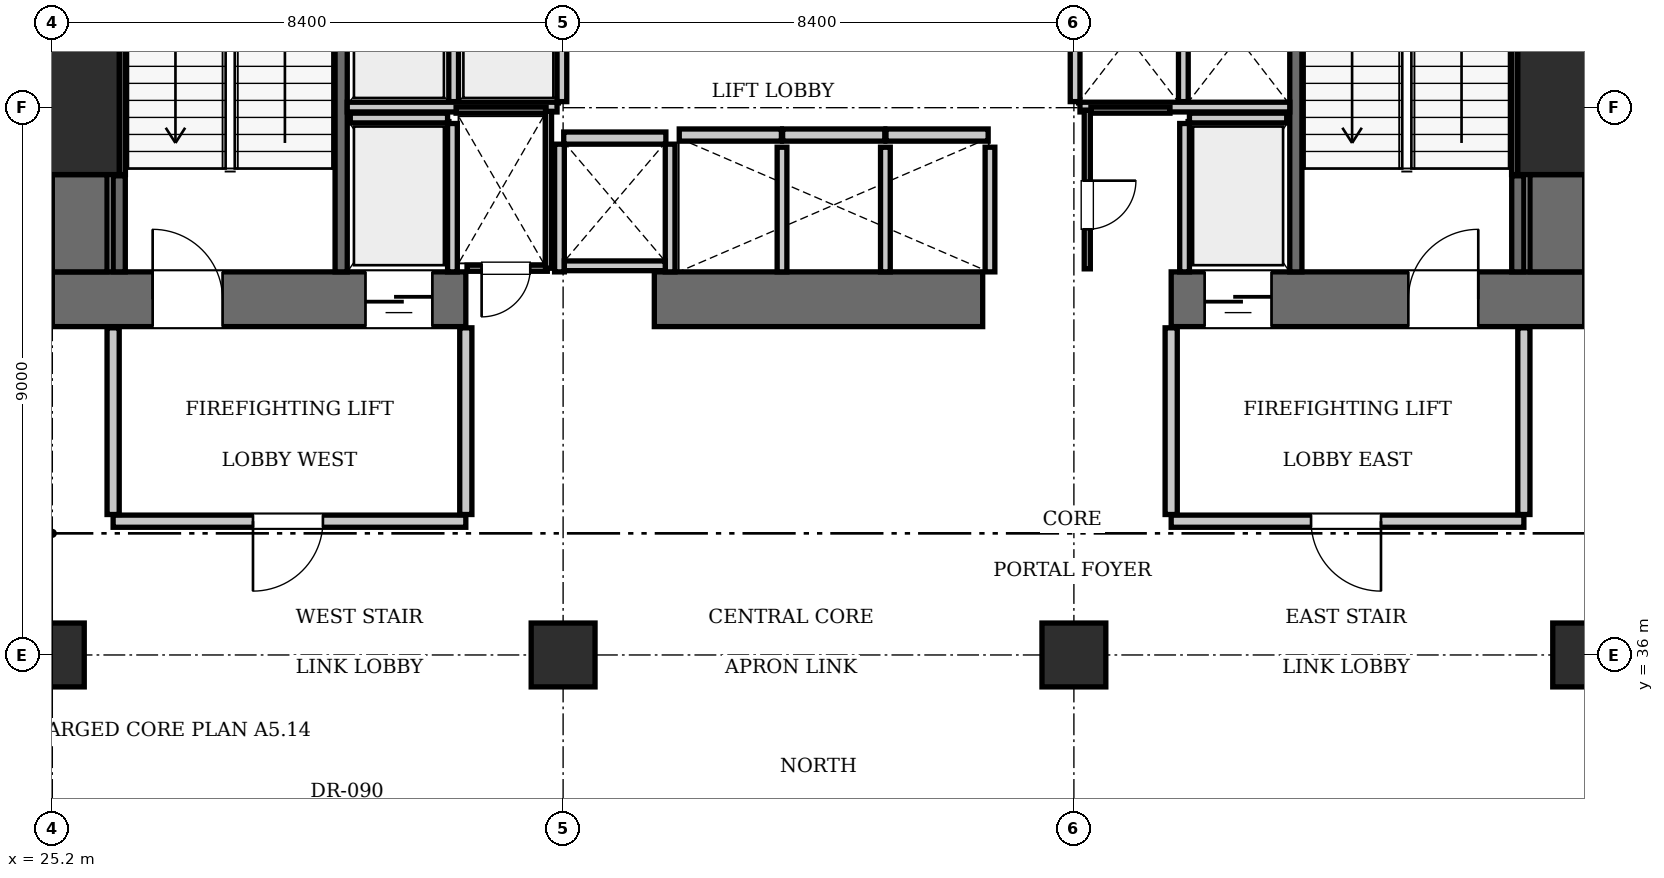
"""IFC4 building model, lengths in metres.
Left out: names, types, materials, properties, quantities, classifications, styles, units other than length and angle.
Written with IfcOpenShell. Run it as: python <this file> out.ifc"""

import sys

from ifc_helpers import new_model, si_unit, direction, frame, frame_2d, origin, origin_2d, place, context, subcontext, project, spatial, rectangle, extrude, element, fill, save


model = new_model("IFC4")
c1 = context("Model", 3, precision=1e-05, world=origin(), true_north=direction((0.0, 1.0)))
c2 = subcontext(c1, "Body", "Model", "MODEL_VIEW")
j1 = project(units=[si_unit("LENGTHUNIT", "METRE"), si_unit("PLANEANGLEUNIT", "RADIAN")], contexts=[c1])
p1 = place(None, origin())
s1 = spatial("IfcSite", under=j1, at=p1, CompositionType="ELEMENT")
p2 = place(p1, origin())
s2 = spatial("IfcBuilding", under=s1, at=p2, CompositionType="ELEMENT")
p3 = place(p2, frame((0.0, 0.0, 103.95)))
s3 = spatial("IfcBuildingStorey", under=s2, at=p3, CompositionType="ELEMENT", Elevation=103.95)
for number, where, z_axis, x_axis in (
    (1, (25.2, 45.0, 0.0), (0.0, 0.0, 1.0), (1.0, 0.0, 0.0)),
    (2, (50.4, 45.0, 0.0), (0.0, 0.0, 1.0), (1.0, 0.0, 0.0)),
):
    element("IfcColumn", number, at=place(p3, frame(where, z_axis=z_axis, x_axis=x_axis)), inside=s3, PredefinedType="COLUMN", context=c2, shape_type="SweptSolid", body=[
        extrude(rectangle(XDim=2.2, YDim=2.2, at=origin_2d()), origin(), (0.0, 0.0, 1.0), 3.85),
    ])
p4 = place(p3, frame((25.2, 41.85, 0.0), z_axis=(0.0, 0.0, 1.0), x_axis=(1.0, 0.0, 0.0)))
e3 = element("IfcWall", 3, at=p4, inside=s3, PredefinedType="SHEAR", context=c2, shape_type="SweptSolid", body=[
    extrude(rectangle(XDim=6.8, YDim=0.9, at=frame_2d((3.4, 0.0))), origin(), (0.0, 0.0, 1.0), 3.85),
])
p5 = place(p4, frame((1.65, 0.0, 0.0)))
e4 = element("IfcOpeningElement", 4, at=p5, cuts=e3, PredefinedType="OPENING", context=c2, shape_type="SweptSolid", body=[
    extrude(rectangle(XDim=1.15, YDim=2.15, at=frame_2d((0.575, 1.075))), frame((0.0, 0.46, 0.0), z_axis=(0.0, -1.0, 0.0), x_axis=(1.0, 0.0, 0.0)), (0.0, 0.0, 1.0), 0.92),
])
p6 = place(p4, frame((5.15, 0.0, 0.0)))
e5 = element("IfcOpeningElement", 5, at=p6, cuts=e3, PredefinedType="OPENING", context=c2, shape_type="SweptSolid", body=[
    extrude(rectangle(XDim=1.1, YDim=2.2, at=frame_2d((0.55, 1.1))), frame((0.0, 0.46, 0.0), z_axis=(0.0, -1.0, 0.0), x_axis=(1.0, 0.0, 0.0)), (0.0, 0.0, 1.0), 0.92),
])
p7 = place(p3, frame((35.1, 41.85, 0.0), z_axis=(0.0, 0.0, 1.0), x_axis=(1.0, 0.0, 0.0)))
e6 = element("IfcWall", 6, at=p7, inside=s3, PredefinedType="SHEAR", context=c2, shape_type="SweptSolid", body=[
    extrude(rectangle(XDim=5.4, YDim=0.9, at=frame_2d((2.7, 0.0))), origin(), (0.0, 0.0, 1.0), 3.85),
])
p8 = place(p3, frame((43.6, 41.85, 0.0), z_axis=(0.0, 0.0, 1.0), x_axis=(1.0, 0.0, 0.0)))
e7 = element("IfcWall", 7, at=p8, inside=s3, PredefinedType="SHEAR", context=c2, shape_type="SweptSolid", body=[
    extrude(rectangle(XDim=6.8, YDim=0.9, at=frame_2d((3.4, 0.0))), origin(), (0.0, 0.0, 1.0), 3.85),
])
p9 = place(p8, frame((3.9, 0.0, 0.0)))
e8 = element("IfcOpeningElement", 8, at=p9, cuts=e7, PredefinedType="OPENING", context=c2, shape_type="SweptSolid", body=[
    extrude(rectangle(XDim=1.15, YDim=2.15, at=frame_2d((0.575, 1.075))), frame((0.0, 0.46, 0.0), z_axis=(0.0, -1.0, 0.0), x_axis=(1.0, 0.0, 0.0)), (0.0, 0.0, 1.0), 0.92),
])
p10 = place(p8, frame((0.55, 0.0, 0.0)))
e9 = element("IfcOpeningElement", 9, at=p10, cuts=e7, PredefinedType="OPENING", context=c2, shape_type="SweptSolid", body=[
    extrude(rectangle(XDim=1.1, YDim=2.2, at=frame_2d((0.55, 1.1))), frame((0.0, 0.46, 0.0), z_axis=(0.0, -1.0, 0.0), x_axis=(1.0, 0.0, 0.0)), (0.0, 0.0, 1.0), 0.92),
])
for number, where, z_axis, x_axis in (
    (10, (25.65, 42.3, 0.0), (0.0, 0.0, 1.0), (0.0, 1.0, 0.0)),
    (11, (49.95, 42.3, 0.0), (0.0, 0.0, 1.0), (0.0, 1.0, 0.0)),
):
    element("IfcWall", number, at=place(p3, frame(where, z_axis=z_axis, x_axis=x_axis)), inside=s3, PredefinedType="SHEAR", context=c2, shape_type="SweptSolid", body=[
        extrude(rectangle(XDim=1.6, YDim=0.9, at=frame_2d((0.8, 0.0))), origin(), (0.0, 0.0, 1.0), 3.85),
    ])
for number, where, z_axis, x_axis in (
    (12, (25.2, 36.0, 0.0), (0.0, 0.0, 1.0), (1.0, 0.0, 0.0)),
    (13, (33.6, 36.0, 0.0), (0.0, 0.0, 1.0), (1.0, 0.0, 0.0)),
    (14, (42.0, 36.0, 0.0), (0.0, 0.0, 1.0), (1.0, 0.0, 0.0)),
    (15, (50.4, 36.0, 0.0), (0.0, 0.0, 1.0), (1.0, 0.0, 0.0)),
):
    element("IfcColumn", number, at=place(p3, frame(where, z_axis=z_axis, x_axis=x_axis)), inside=s3, PredefinedType="COLUMN", context=c2, shape_type="SweptSolid", body=[
        extrude(rectangle(XDim=1.05, YDim=1.05, at=origin_2d()), origin(), (0.0, 0.0, 1.0), 3.85),
    ])
p11 = place(p3, frame((29.95, 42.3, 0.0), z_axis=(0.0, 0.0, 1.0), x_axis=(0.0, 1.0, 0.0)))
e16 = element("IfcWall", 16, at=p11, inside=s3, PredefinedType="SOLIDWALL", context=c2, shape_type="SweptSolid", body=[
    extrude(rectangle(XDim=8.85, YDim=0.2, at=frame_2d((4.425, 0.0))), origin(), (0.0, 0.0, 1.0), 3.61),
])
p12 = place(p3, frame((26.3, 42.3, 0.0), z_axis=(0.0, 0.0, 1.0), x_axis=(0.0, 1.0, 0.0)))
e17 = element("IfcWall", 17, at=p12, inside=s3, PredefinedType="SOLIDWALL", context=c2, shape_type="SweptSolid", body=[
    extrude(rectangle(XDim=1.58, YDim=0.2, at=frame_2d((0.79, 0.0))), origin(), (0.0, 0.0, 1.0), 3.61),
])
p13 = place(p3, frame((26.352, 43.9, 0.0), z_axis=(0.0, 0.0, 1.0), x_axis=(0.0, 1.0, 0.0)))
e18 = element("IfcWall", 18, at=p13, inside=s3, PredefinedType="SOLIDWALL", context=c2, shape_type="SweptSolid", body=[
    extrude(rectangle(XDim=2.2, YDim=0.1, at=frame_2d((1.1, 0.0))), origin(), (0.0, 0.0, 1.0), 3.61),
])
p14 = place(p3, frame((45.65, 42.3, 0.0), z_axis=(0.0, 0.0, 1.0), x_axis=(0.0, 1.0, 0.0)))
e19 = element("IfcWall", 19, at=p14, inside=s3, PredefinedType="SOLIDWALL", context=c2, shape_type="SweptSolid", body=[
    extrude(rectangle(XDim=8.85, YDim=0.2, at=frame_2d((4.425, 0.0))), origin(), (0.0, 0.0, 1.0), 3.61),
])
p15 = place(p3, frame((49.3, 42.3, 0.0), z_axis=(0.0, 0.0, 1.0), x_axis=(0.0, 1.0, 0.0)))
e20 = element("IfcWall", 20, at=p15, inside=s3, PredefinedType="SOLIDWALL", context=c2, shape_type="SweptSolid", body=[
    extrude(rectangle(XDim=1.58, YDim=0.2, at=frame_2d((0.79, 0.0))), origin(), (0.0, 0.0, 1.0), 3.61),
])
p16 = place(p3, frame((49.248, 43.9, 0.0), z_axis=(0.0, 0.0, 1.0), x_axis=(0.0, 1.0, 0.0)))
e21 = element("IfcWall", 21, at=p16, inside=s3, PredefinedType="SOLIDWALL", context=c2, shape_type="SweptSolid", body=[
    extrude(rectangle(XDim=2.2, YDim=0.1, at=frame_2d((1.1, 0.0))), origin(), (0.0, 0.0, 1.0), 3.61),
])
for number, where, z_axis, x_axis in (
    (22, (35.51, 44.55, 0.0), (0.0, 0.0, 1.0), (1.0, 0.0, 0.0)),
    (23, (37.21, 44.55, 0.0), (0.0, 0.0, 1.0), (1.0, 0.0, 0.0)),
):
    element("IfcWall", number, at=place(p3, frame(where, z_axis=z_axis, x_axis=x_axis)), inside=s3, PredefinedType="SOLIDWALL", context=c2, shape_type="SweptSolid", body=[
        extrude(rectangle(XDim=1.68, YDim=0.2, at=frame_2d((0.84, 0.0))), origin(), (0.0, 0.0, 1.0), 3.61),
    ])
p17 = place(p3, frame((38.91, 44.55, 0.0), z_axis=(0.0, 0.0, 1.0), x_axis=(1.0, 0.0, 0.0)))
e24 = element("IfcWall", 24, at=p17, inside=s3, PredefinedType="SOLIDWALL", context=c2, shape_type="SweptSolid", body=[
    extrude(rectangle(XDim=1.68, YDim=0.2, at=frame_2d((0.84, 0.0))), origin(), (0.0, 0.0, 1.0), 3.61),
])
p18 = place(p3, frame((33.61, 44.5, 0.0), z_axis=(0.0, 0.0, 1.0), x_axis=(1.0, 0.0, 0.0)))
e25 = element("IfcWall", 25, at=p18, inside=s3, PredefinedType="SOLIDWALL", context=c2, shape_type="SweptSolid", body=[
    extrude(rectangle(XDim=1.68, YDim=0.2, at=frame_2d((0.84, 0.0))), origin(), (0.0, 0.0, 1.0), 3.61),
])
p19 = place(p3, frame((30.1, 44.83, 0.0), z_axis=(0.0, 0.0, 1.0), x_axis=(1.0, 0.0, 0.0)))
e26 = element("IfcWall", 26, at=p19, inside=s3, PredefinedType="SOLIDWALL", context=c2, shape_type="SweptSolid", body=[
    extrude(rectangle(XDim=1.6, YDim=0.16, at=frame_2d((0.8, 0.0))), origin(), (0.0, 0.0, 1.0), 3.61),
])
p20 = place(p3, frame((31.78, 42.3, 0.0), z_axis=(0.0, 0.0, 1.0), x_axis=(0.0, 1.0, 0.0)))
e27 = element("IfcWall", 27, at=p20, inside=s3, PredefinedType="SOLIDWALL", context=c2, shape_type="SweptSolid", body=[
    extrude(rectangle(XDim=2.44, YDim=0.16, at=frame_2d((1.22, 0.0))), origin(), (0.0, 0.0, 1.0), 3.61),
])
p21 = place(p3, frame((43.9, 44.83, 0.0), z_axis=(0.0, 0.0, 1.0), x_axis=(1.0, 0.0, 0.0)))
e28 = element("IfcWall", 28, at=p21, inside=s3, PredefinedType="SOLIDWALL", context=c2, shape_type="SweptSolid", body=[
    extrude(rectangle(XDim=1.6, YDim=0.16, at=frame_2d((0.8, 0.0))), origin(), (0.0, 0.0, 1.0), 3.61),
])
p22 = place(p3, frame((43.82, 42.3, 0.0), z_axis=(0.0, 0.0, 1.0), x_axis=(0.0, 1.0, 0.0)))
e29 = element("IfcWall", 29, at=p22, inside=s3, PredefinedType="SOLIDWALL", context=c2, shape_type="SweptSolid", body=[
    extrude(rectangle(XDim=2.44, YDim=0.16, at=frame_2d((1.22, 0.0))), origin(), (0.0, 0.0, 1.0), 3.61),
])
for number, where, z_axis, x_axis in (
    (30, (31.8, 45.1, 0.0), (0.0, 0.0, 1.0), (0.0, 1.0, 0.0)),
    (31, (33.58, 45.1, 0.0), (0.0, 0.0, 1.0), (0.0, 1.0, 0.0)),
):
    element("IfcWall", number, at=place(p3, frame(where, z_axis=z_axis, x_axis=x_axis)), inside=s3, PredefinedType="SOLIDWALL", context=c2, shape_type="SweptSolid", body=[
        extrude(rectangle(XDim=1.95, YDim=0.16, at=frame_2d((0.975, 0.0))), origin(), (0.0, 0.0, 1.0), 3.61),
    ])
p23 = place(p3, frame((30.05, 45.01, 0.0), z_axis=(0.0, 0.0, 1.0), x_axis=(1.0, 0.0, 0.0)))
e32 = element("IfcWall", 32, at=p23, inside=s3, PredefinedType="SOLIDWALL", context=c2, shape_type="SweptSolid", body=[
    extrude(rectangle(XDim=3.45, YDim=0.16, at=frame_2d((1.725, 0.0))), origin(), (0.0, 0.0, 1.0), 3.61),
])
for number, where, z_axis, x_axis in (
    (33, (42.02, 45.1, 0.0), (0.0, 0.0, 1.0), (0.0, 1.0, 0.0)),
    (34, (43.8, 45.1, 0.0), (0.0, 0.0, 1.0), (0.0, 1.0, 0.0)),
):
    element("IfcWall", number, at=place(p3, frame(where, z_axis=z_axis, x_axis=x_axis)), inside=s3, PredefinedType="SOLIDWALL", context=c2, shape_type="SweptSolid", body=[
        extrude(rectangle(XDim=1.95, YDim=0.16, at=frame_2d((0.975, 0.0))), origin(), (0.0, 0.0, 1.0), 3.61),
    ])
p24 = place(p3, frame((42.1, 45.01, 0.0), z_axis=(0.0, 0.0, 1.0), x_axis=(1.0, 0.0, 0.0)))
e35 = element("IfcWall", 35, at=p24, inside=s3, PredefinedType="SOLIDWALL", context=c2, shape_type="SweptSolid", body=[
    extrude(rectangle(XDim=3.45, YDim=0.16, at=frame_2d((1.725, 0.0))), origin(), (0.0, 0.0, 1.0), 3.61),
])
for number, where, z_axis, x_axis in (
    (36, (37.2, 42.3, 0.0), (0.0, 0.0, 1.0), (0.0, 1.0, 0.0)),
    (37, (38.9, 42.3, 0.0), (0.0, 0.0, 1.0), (0.0, 1.0, 0.0)),
    (38, (40.62, 42.3, 0.0), (0.0, 0.0, 1.0), (0.0, 1.0, 0.0)),
):
    element("IfcWall", number, at=place(p3, frame(where, z_axis=z_axis, x_axis=x_axis)), inside=s3, PredefinedType="SOLIDWALL", context=c2, shape_type="SweptSolid", body=[
        extrude(rectangle(XDim=2.05, YDim=0.16, at=frame_2d((1.025, 0.0))), origin(), (0.0, 0.0, 1.0), 3.61),
    ])
for number, where, z_axis, x_axis in (
    (39, (33.54, 42.3, 0.0), (0.0, 0.0, 1.0), (0.0, 1.0, 0.0)),
    (40, (35.36, 42.3, 0.0), (0.0, 0.0, 1.0), (0.0, 1.0, 0.0)),
):
    element("IfcWall", number, at=place(p3, frame(where, z_axis=z_axis, x_axis=x_axis)), inside=s3, PredefinedType="SOLIDWALL", context=c2, shape_type="SweptSolid", body=[
        extrude(rectangle(XDim=2.1, YDim=0.16, at=frame_2d((1.05, 0.0))), origin(), (0.0, 0.0, 1.0), 3.61),
    ])
p25 = place(p3, frame((33.62, 42.4, 0.0), z_axis=(0.0, 0.0, 1.0), x_axis=(1.0, 0.0, 0.0)))
e41 = element("IfcWall", 41, at=p25, inside=s3, PredefinedType="SOLIDWALL", context=c2, shape_type="SweptSolid", body=[
    extrude(rectangle(XDim=1.66, YDim=0.16, at=frame_2d((0.83, 0.0))), origin(), (0.0, 0.0, 1.0), 3.61),
])
p26 = place(p3, frame((26.2, 38.2, 0.0), z_axis=(0.0, 0.0, 1.0), x_axis=(1.0, 0.0, 0.0)))
e42 = element("IfcWall", 42, at=p26, inside=s3, PredefinedType="PARTITIONING", context=c2, shape_type="SweptSolid", body=[
    extrude(rectangle(XDim=5.8, YDim=0.2, at=frame_2d((2.9, 0.0))), origin(), (0.0, 0.0, 1.0), 3.61),
])
p27 = place(p26, frame((2.3, 0.0, 0.0)))
e43 = element("IfcOpeningElement", 43, at=p27, cuts=e42, PredefinedType="OPENING", context=c2, shape_type="SweptSolid", body=[
    extrude(rectangle(XDim=1.15, YDim=2.15, at=frame_2d((0.575, 1.075))), frame((0.0, 0.11, 0.0), z_axis=(0.0, -1.0, 0.0), x_axis=(1.0, 0.0, 0.0)), (0.0, 0.0, 1.0), 0.22),
])
for number, where, z_axis, x_axis in (
    (44, (26.2, 38.31, 0.0), (0.0, 0.0, 1.0), (0.0, 1.0, 0.0)),
    (45, (32.0, 38.31, 0.0), (0.0, 0.0, 1.0), (0.0, 1.0, 0.0)),
):
    element("IfcWall", number, at=place(p3, frame(where, z_axis=z_axis, x_axis=x_axis)), inside=s3, PredefinedType="PARTITIONING", context=c2, shape_type="SweptSolid", body=[
        extrude(rectangle(XDim=3.07, YDim=0.2, at=frame_2d((1.535, 0.0))), origin(), (0.0, 0.0, 1.0), 3.61),
    ])
p28 = place(p3, frame((43.6, 38.2, 0.0), z_axis=(0.0, 0.0, 1.0), x_axis=(1.0, 0.0, 0.0)))
e46 = element("IfcWall", 46, at=p28, inside=s3, PredefinedType="PARTITIONING", context=c2, shape_type="SweptSolid", body=[
    extrude(rectangle(XDim=5.8, YDim=0.2, at=frame_2d((2.9, 0.0))), origin(), (0.0, 0.0, 1.0), 3.61),
])
p29 = place(p28, frame((2.3, 0.0, 0.0)))
e47 = element("IfcOpeningElement", 47, at=p29, cuts=e46, PredefinedType="OPENING", context=c2, shape_type="SweptSolid", body=[
    extrude(rectangle(XDim=1.15, YDim=2.15, at=frame_2d((0.575, 1.075))), frame((0.0, 0.11, 0.0), z_axis=(0.0, -1.0, 0.0), x_axis=(1.0, 0.0, 0.0)), (0.0, 0.0, 1.0), 0.22),
])
for number, where, z_axis, x_axis in (
    (48, (43.6, 38.31, 0.0), (0.0, 0.0, 1.0), (0.0, 1.0, 0.0)),
    (49, (49.4, 38.31, 0.0), (0.0, 0.0, 1.0), (0.0, 1.0, 0.0)),
):
    element("IfcWall", number, at=place(p3, frame(where, z_axis=z_axis, x_axis=x_axis)), inside=s3, PredefinedType="PARTITIONING", context=c2, shape_type="SweptSolid", body=[
        extrude(rectangle(XDim=3.07, YDim=0.2, at=frame_2d((1.535, 0.0))), origin(), (0.0, 0.0, 1.0), 3.61),
    ])
p30 = place(p3, frame((32.02, 42.36, 0.0), z_axis=(0.0, 0.0, 1.0), x_axis=(1.0, 0.0, 0.0)))
e50 = element("IfcWall", 50, at=p30, inside=s3, PredefinedType="PARTITIONING", context=c2, shape_type="SweptSolid", body=[
    extrude(rectangle(XDim=1.32, YDim=0.1, at=frame_2d((0.66, 0.0))), origin(), (0.0, 0.0, 1.0), 3.61),
])
p31 = place(p30, frame((0.24, 0.0, 0.0)))
e51 = element("IfcOpeningElement", 51, at=p31, cuts=e50, PredefinedType="OPENING", context=c2, shape_type="SweptSolid", body=[
    extrude(rectangle(XDim=0.8, YDim=2.05, at=frame_2d((0.4, 1.025))), frame((0.0, 0.06, 0.0), z_axis=(0.0, -1.0, 0.0), x_axis=(1.0, 0.0, 0.0)), (0.0, 0.0, 1.0), 0.12),
])
p32 = place(p3, frame((31.84, 44.96, 0.0), z_axis=(0.0, 0.0, 1.0), x_axis=(1.0, 0.0, 0.0)))
e52 = element("IfcWall", 52, at=p32, inside=s3, PredefinedType="PARTITIONING", context=c2, shape_type="SweptSolid", body=[
    extrude(rectangle(XDim=1.48, YDim=0.1, at=frame_2d((0.74, 0.0))), origin(), (0.0, 0.0, 1.0), 3.61),
])
p33 = place(p3, frame((33.36, 42.36, 0.0), z_axis=(0.0, 0.0, 1.0), x_axis=(0.0, 1.0, 0.0)))
e53 = element("IfcWall", 53, at=p33, inside=s3, PredefinedType="PARTITIONING", context=c2, shape_type="SweptSolid", body=[
    extrude(rectangle(XDim=2.58, YDim=0.1, at=frame_2d((1.29, 0.0))), origin(), (0.0, 0.0, 1.0), 3.61),
])
p34 = place(p3, frame((42.22, 42.35, 0.0), z_axis=(0.0, 0.0, 1.0), x_axis=(0.0, 1.0, 0.0)))
e54 = element("IfcWall", 54, at=p34, inside=s3, PredefinedType="PARTITIONING", context=c2, shape_type="SweptSolid", body=[
    extrude(rectangle(XDim=2.61, YDim=0.1, at=frame_2d((1.305, 0.0))), origin(), (0.0, 0.0, 1.0), 3.61),
])
p35 = place(p34, frame((0.65, 0.0, 0.0)))
e55 = element("IfcOpeningElement", 55, at=p35, cuts=e54, PredefinedType="OPENING", context=c2, shape_type="SweptSolid", body=[
    extrude(rectangle(XDim=0.8, YDim=2.05, at=frame_2d((0.4, 1.025))), frame((0.0, 0.06, 0.0), z_axis=(0.0, -1.0, 0.0), x_axis=(1.0, 0.0, 0.0)), (0.0, 0.0, 1.0), 0.12),
])
p36 = place(p3, frame((42.28, 44.96, 0.0), z_axis=(0.0, 0.0, 1.0), x_axis=(1.0, 0.0, 0.0)))
e56 = element("IfcWall", 56, at=p36, inside=s3, PredefinedType="PARTITIONING", context=c2, shape_type="SweptSolid", body=[
    extrude(rectangle(XDim=1.3, YDim=0.1, at=frame_2d((0.65, 0.0))), origin(), (0.0, 0.0, 1.0), 3.61),
])
p37 = place(p5, origin())
e57 = element("IfcDoor", 57, at=p37, inside=s3, OperationType="SINGLE_SWING_LEFT", PredefinedType="DOOR", context=c2, shape_type="SweptSolid", body=[
    extrude(rectangle(XDim=1.15, YDim=2.15, at=frame_2d((0.575, 1.075))), frame((0.0, 0.025, 0.0), z_axis=(0.0, -1.0, 0.0), x_axis=(1.0, 0.0, 0.0)), (0.0, 0.0, 1.0), 0.05),
])
fill(e4, e57)
p38 = place(p9, origin())
e58 = element("IfcDoor", 58, at=p38, inside=s3, OperationType="SINGLE_SWING_RIGHT", PredefinedType="DOOR", context=c2, shape_type="SweptSolid", body=[
    extrude(rectangle(XDim=1.15, YDim=2.15, at=frame_2d((0.575, 1.075))), frame((0.0, 0.025, 0.0), z_axis=(0.0, -1.0, 0.0), x_axis=(1.0, 0.0, 0.0)), (0.0, 0.0, 1.0), 0.05),
])
fill(e8, e58)
p39 = place(p6, frame((1.1, 0.0, 0.0), z_axis=(0.0, 0.0, 1.0), x_axis=(-1.0, 0.0, 0.0)))
e59 = element("IfcDoor", 59, at=p39, inside=s3, OperationType="SLIDING_TO_LEFT", PredefinedType="DOOR", context=c2, shape_type="SweptSolid", body=[
    extrude(rectangle(XDim=1.1, YDim=2.2, at=frame_2d((0.55, 1.1))), frame((0.0, 0.025, 0.0), z_axis=(0.0, -1.0, 0.0), x_axis=(1.0, 0.0, 0.0)), (0.0, 0.0, 1.0), 0.05),
])
fill(e5, e59)
p40 = place(p10, frame((1.1, 0.0, 0.0), z_axis=(0.0, 0.0, 1.0), x_axis=(-1.0, 0.0, 0.0)))
e60 = element("IfcDoor", 60, at=p40, inside=s3, OperationType="SLIDING_TO_LEFT", PredefinedType="DOOR", context=c2, shape_type="SweptSolid", body=[
    extrude(rectangle(XDim=1.1, YDim=2.2, at=frame_2d((0.55, 1.1))), frame((0.0, 0.025, 0.0), z_axis=(0.0, -1.0, 0.0), x_axis=(1.0, 0.0, 0.0)), (0.0, 0.0, 1.0), 0.05),
])
fill(e9, e60)
p41 = place(p27, frame((1.15, 0.0, 0.0), z_axis=(0.0, 0.0, 1.0), x_axis=(-1.0, 0.0, 0.0)))
e61 = element("IfcDoor", 61, at=p41, inside=s3, OperationType="SINGLE_SWING_RIGHT", PredefinedType="DOOR", context=c2, shape_type="SweptSolid", body=[
    extrude(rectangle(XDim=1.15, YDim=2.15, at=frame_2d((0.575, 1.075))), frame((0.0, 0.025, 0.0), z_axis=(0.0, -1.0, 0.0), x_axis=(1.0, 0.0, 0.0)), (0.0, 0.0, 1.0), 0.05),
])
fill(e43, e61)
p42 = place(p29, frame((1.15, 0.0, 0.0), z_axis=(0.0, 0.0, 1.0), x_axis=(-1.0, 0.0, 0.0)))
e62 = element("IfcDoor", 62, at=p42, inside=s3, OperationType="SINGLE_SWING_LEFT", PredefinedType="DOOR", context=c2, shape_type="SweptSolid", body=[
    extrude(rectangle(XDim=1.15, YDim=2.15, at=frame_2d((0.575, 1.075))), frame((0.0, 0.025, 0.0), z_axis=(0.0, -1.0, 0.0), x_axis=(1.0, 0.0, 0.0)), (0.0, 0.0, 1.0), 0.05),
])
fill(e47, e62)
p43 = place(p31, frame((0.8, 0.0, 0.0), z_axis=(0.0, 0.0, 1.0), x_axis=(-1.0, 0.0, 0.0)))
e63 = element("IfcDoor", 63, at=p43, inside=s3, OperationType="SINGLE_SWING_RIGHT", PredefinedType="DOOR", context=c2, shape_type="SweptSolid", body=[
    extrude(rectangle(XDim=0.8, YDim=2.05, at=frame_2d((0.4, 1.025))), frame((0.0, 0.025, 0.0), z_axis=(0.0, -1.0, 0.0), x_axis=(1.0, 0.0, 0.0)), (0.0, 0.0, 1.0), 0.05),
])
fill(e51, e63)
p44 = place(p35, frame((0.8, 0.0, 0.0), z_axis=(0.0, 0.0, 1.0), x_axis=(-1.0, 0.0, 0.0)))
e64 = element("IfcDoor", 64, at=p44, inside=s3, OperationType="SINGLE_SWING_LEFT", PredefinedType="DOOR", context=c2, shape_type="SweptSolid", body=[
    extrude(rectangle(XDim=0.8, YDim=2.05, at=frame_2d((0.4, 1.025))), frame((0.0, 0.025, 0.0), z_axis=(0.0, -1.0, 0.0), x_axis=(1.0, 0.0, 0.0)), (0.0, 0.0, 1.0), 0.05),
])
fill(e55, e64)
save(model, sys.argv[1])
